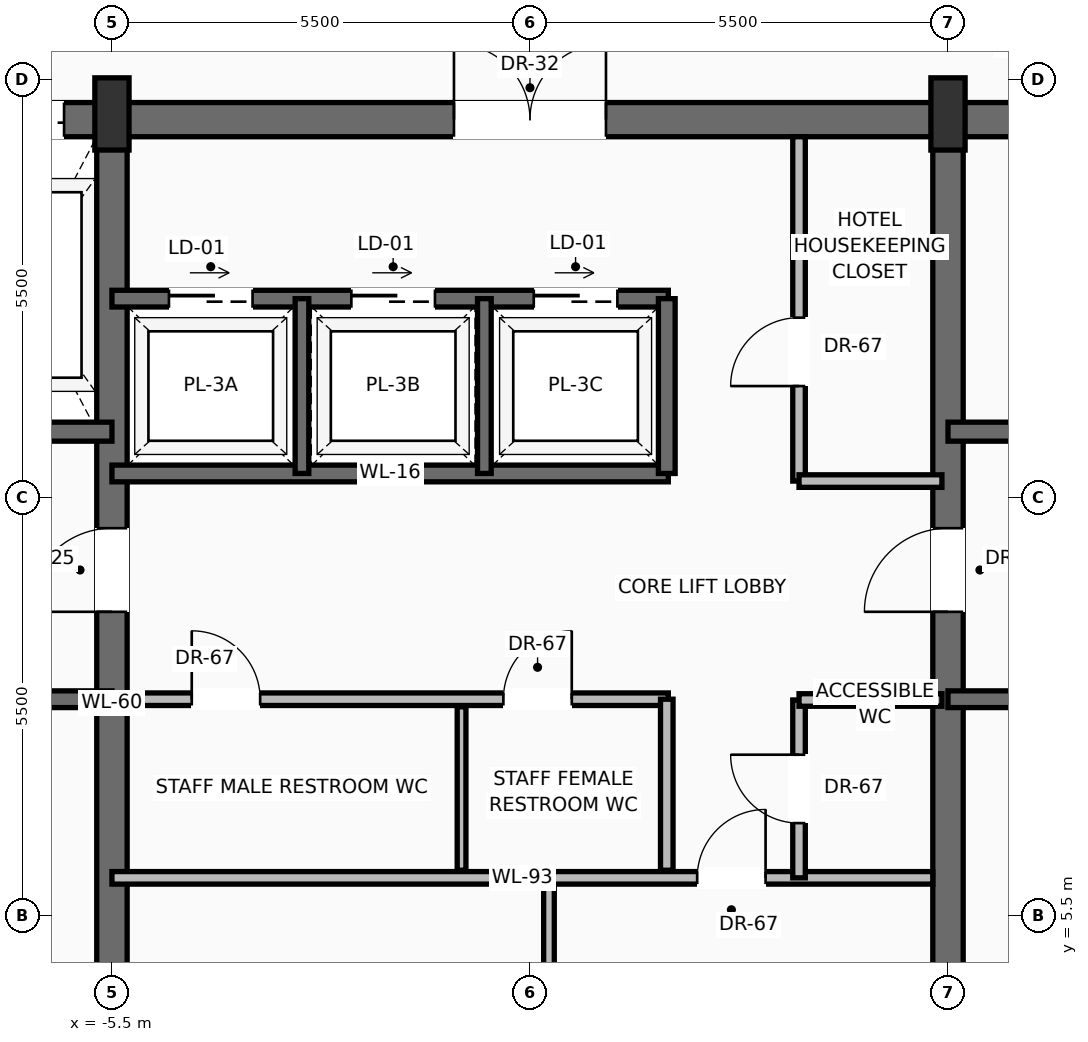
"""IFC4 building model, lengths in metres.
Left out: names, types, materials, properties, quantities, classifications, styles, units other than length and angle.
Written with IfcOpenShell. Run it as: python <this file> out.ifc"""

import sys

from ifc_helpers import new_model, si_unit, direction, frame, frame_2d, origin, origin_2d, place, context, subcontext, project, spatial, rectangle, extrude, source, transform, mapped, element, fill, save


model = new_model("IFC4")
c1 = context("Model", 3, precision=1e-05, world=origin(), true_north=direction((0.0, 1.0)))
c2 = subcontext(c1, "Body", "Model", "MODEL_VIEW")
j1 = project(units=[si_unit("LENGTHUNIT", "METRE"), si_unit("PLANEANGLEUNIT", "RADIAN")], contexts=[c1])
p1 = place(None, origin())
s1 = spatial("IfcSite", under=j1, at=p1, CompositionType="ELEMENT")
p2 = place(p1, origin())
s2 = spatial("IfcBuilding", under=s1, at=p2, CompositionType="ELEMENT")
p3 = place(p2, frame((0.0, 0.0, 300.6)))
s3 = spatial("IfcBuildingStorey", under=s2, at=p3, CompositionType="ELEMENT", Elevation=300.6)
p4 = place(p3, frame((-10.6, 15.975, 0.0), z_axis=(0.0, 0.0, 1.0), x_axis=(1.0, 0.0, 0.0)))
e1 = element("IfcWall", 1, at=p4, inside=s3, PredefinedType="SHEAR", context=c2, shape_type="SweptSolid", body=[
    extrude(rectangle(XDim=21.2, YDim=0.45, at=frame_2d((10.6, 0.0))), origin(), (0.0, 0.0, 1.0), 3.15),
])
p5 = place(p4, frame((3.17, 0.0, 0.0)))
e2 = element("IfcOpeningElement", 2, at=p5, cuts=e1, PredefinedType="OPENING", context=c2, shape_type="SweptSolid", body=[
    extrude(rectangle(XDim=1.3, YDim=2.3, at=frame_2d((0.65, 1.15))), frame((0.0, 0.235, 0.0), z_axis=(0.0, -1.0, 0.0), x_axis=(1.0, 0.0, 0.0)), (0.0, 0.0, 1.0), 0.47),
])
p6 = place(p4, frame((9.6, 0.0, 0.0)))
e3 = element("IfcOpeningElement", 3, at=p6, cuts=e1, PredefinedType="OPENING", context=c2, shape_type="SweptSolid", body=[
    extrude(rectangle(XDim=2.0, YDim=2.4, at=frame_2d((1.0, 1.2))), frame((0.0, 0.235, 0.0), z_axis=(0.0, -1.0, 0.0), x_axis=(1.0, 0.0, 0.0)), (0.0, 0.0, 1.0), 0.47),
])
p7 = place(p3, frame((-5.5, 0.625, 0.0), z_axis=(0.0, 0.0, 1.0), x_axis=(0.0, 1.0, 0.0)))
e4 = element("IfcWall", 4, at=p7, inside=s3, PredefinedType="SHEAR", context=c2, shape_type="SweptSolid", body=[
    extrude(rectangle(XDim=15.35, YDim=0.4, at=frame_2d((7.675, 0.0))), origin(), (0.0, 0.0, 1.0), 3.15),
])
p8 = place(p7, frame((8.875, 0.0, 0.0)))
e5 = element("IfcOpeningElement", 5, at=p8, cuts=e4, PredefinedType="OPENING", context=c2, shape_type="SweptSolid", body=[
    extrude(rectangle(XDim=1.1, YDim=2.2, at=frame_2d((0.55, 1.1))), frame((0.0, 0.21, 0.0), z_axis=(0.0, -1.0, 0.0), x_axis=(1.0, 0.0, 0.0)), (0.0, 0.0, 1.0), 0.42),
])
p9 = place(p3, frame((5.5, 0.625, 0.0), z_axis=(0.0, 0.0, 1.0), x_axis=(0.0, 1.0, 0.0)))
e6 = element("IfcWall", 6, at=p9, inside=s3, PredefinedType="SHEAR", context=c2, shape_type="SweptSolid", body=[
    extrude(rectangle(XDim=15.35, YDim=0.4, at=frame_2d((7.675, 0.0))), origin(), (0.0, 0.0, 1.0), 3.15),
])
p10 = place(p9, frame((8.875, 0.0, 0.0)))
e7 = element("IfcOpeningElement", 7, at=p10, cuts=e6, PredefinedType="OPENING", context=c2, shape_type="SweptSolid", body=[
    extrude(rectangle(XDim=1.1, YDim=2.2, at=frame_2d((0.55, 1.1))), frame((0.0, 0.21, 0.0), z_axis=(0.0, -1.0, 0.0), x_axis=(1.0, 0.0, 0.0)), (0.0, 0.0, 1.0), 0.42),
])
m1 = source(origin(), c2, "Body", "SweptSolid", [
    extrude(rectangle(XDim=0.45, YDim=0.95, at=origin_2d()), origin(), (0.0, 0.0, 1.0), 3.45),
])
for number, where, z_axis, x_axis in (
    (8, (-5.5, 16.05, 0.0), (0.0, 0.0, 1.0), (1.0, 0.0, 0.0)),
    (9, (5.5, 16.05, 0.0), (0.0, 0.0, 1.0), (1.0, 0.0, 0.0)),
):
    element("IfcColumn", number, at=place(p3, frame(where, z_axis=z_axis, x_axis=x_axis)), inside=s3, PredefinedType="PILASTER", context=c2, shape_type="MappedRepresentation", body=[
        mapped(m1, transform((0.0, 0.0, 0.0), scale=1.0)),
    ])
p11 = place(p3, frame((-5.5, 8.35, 0.0), z_axis=(0.0, 0.0, 1.0), x_axis=(-1.0, 0.0, 0.0)))
e10 = element("IfcWall", 10, at=p11, inside=s3, PredefinedType="SOLIDWALL", context=c2, shape_type="SweptSolid", body=[
    extrude(rectangle(XDim=4.65, YDim=0.22, at=frame_2d((2.325, 0.0))), origin(), (0.0, 0.0, 1.0), 3.15),
])
p12 = place(p11, frame((2.5, 0.0, 0.0)))
e11 = element("IfcOpeningElement", 11, at=p12, cuts=e10, PredefinedType="OPENING", context=c2, shape_type="SweptSolid", body=[
    extrude(rectangle(XDim=1.15, YDim=2.2, at=frame_2d((0.575, 1.1))), frame((0.0, 0.12, 0.0), z_axis=(0.0, -1.0, 0.0), x_axis=(1.0, 0.0, 0.0)), (0.0, 0.0, 1.0), 0.24),
])
p13 = place(p3, frame((-5.5, 11.87, 0.0), z_axis=(0.0, 0.0, 1.0), x_axis=(-1.0, 0.0, 0.0)))
e12 = element("IfcWall", 12, at=p13, inside=s3, PredefinedType="SOLIDWALL", context=c2, shape_type="SweptSolid", body=[
    extrude(rectangle(XDim=4.65, YDim=0.25, at=frame_2d((2.325, 0.0))), origin(), (0.0, 0.0, 1.0), 3.15),
])
p14 = place(p13, frame((2.95, 0.0, 0.0)))
e13 = element("IfcOpeningElement", 13, at=p14, cuts=e12, PredefinedType="OPENING", context=c2, shape_type="SweptSolid", body=[
    extrude(rectangle(XDim=1.2, YDim=2.25, at=frame_2d((0.6, 1.125))), frame((0.0, 0.135, 0.0), z_axis=(0.0, -1.0, 0.0), x_axis=(1.0, 0.0, 0.0)), (0.0, 0.0, 1.0), 0.27),
])
p15 = place(p3, frame((10.15, 8.35, 0.0), z_axis=(0.0, 0.0, 1.0), x_axis=(-1.0, 0.0, 0.0)))
e14 = element("IfcWall", 14, at=p15, inside=s3, PredefinedType="SOLIDWALL", context=c2, shape_type="SweptSolid", body=[
    extrude(rectangle(XDim=4.65, YDim=0.22, at=frame_2d((2.325, 0.0))), origin(), (0.0, 0.0, 1.0), 3.15),
])
p16 = place(p15, frame((1.0, 0.0, 0.0)))
e15 = element("IfcOpeningElement", 15, at=p16, cuts=e14, PredefinedType="OPENING", context=c2, shape_type="SweptSolid", body=[
    extrude(rectangle(XDim=1.15, YDim=2.2, at=frame_2d((0.575, 1.1))), frame((0.0, 0.12, 0.0), z_axis=(0.0, -1.0, 0.0), x_axis=(1.0, 0.0, 0.0)), (0.0, 0.0, 1.0), 0.24),
])
p17 = place(p3, frame((10.15, 11.87, 0.0), z_axis=(0.0, 0.0, 1.0), x_axis=(-1.0, 0.0, 0.0)))
e16 = element("IfcWall", 16, at=p17, inside=s3, PredefinedType="SOLIDWALL", context=c2, shape_type="SweptSolid", body=[
    extrude(rectangle(XDim=4.65, YDim=0.25, at=frame_2d((2.325, 0.0))), origin(), (0.0, 0.0, 1.0), 3.15),
])
p18 = place(p17, frame((0.5, 0.0, 0.0)))
e17 = element("IfcOpeningElement", 17, at=p18, cuts=e16, PredefinedType="OPENING", context=c2, shape_type="SweptSolid", body=[
    extrude(rectangle(XDim=1.2, YDim=2.25, at=frame_2d((0.6, 1.125))), frame((0.0, 0.135, 0.0), z_axis=(0.0, -1.0, 0.0), x_axis=(1.0, 0.0, 0.0)), (0.0, 0.0, 1.0), 0.27),
])
p19 = place(p3, frame((-5.5, 6.0, 0.0), z_axis=(0.0, 0.0, 1.0), x_axis=(1.0, 0.0, 0.0)))
e18 = element("IfcWall", 18, at=p19, inside=s3, PredefinedType="PARTITIONING", context=c2, shape_type="SweptSolid", body=[
    extrude(rectangle(XDim=10.8, YDim=0.165, at=frame_2d((5.4, 0.0))), origin(), (0.0, 0.0, 1.0), 3.142),
])
p20 = place(p19, frame((7.7, 0.0, 0.0)))
e19 = element("IfcOpeningElement", 19, at=p20, cuts=e18, PredefinedType="OPENING", context=c2, shape_type="SweptSolid", body=[
    extrude(rectangle(XDim=0.9, YDim=2.1, at=frame_2d((0.45, 1.05))), frame((0.0, 0.093, 0.0), z_axis=(0.0, -1.0, 0.0), x_axis=(1.0, 0.0, 0.0)), (0.0, 0.0, 1.0), 0.185),
])
p21 = place(p3, frame((0.25, 0.85, 0.0), z_axis=(0.0, 0.0, 1.0), x_axis=(0.0, 1.0, 0.0)))
e20 = element("IfcWall", 20, at=p21, inside=s3, PredefinedType="PARTITIONING", context=c2, shape_type="SweptSolid", body=[
    extrude(rectangle(XDim=5.03, YDim=0.14, at=frame_2d((2.515, 0.0))), origin(), (0.0, 0.0, 1.0), 3.142),
])
p22 = place(p21, frame((2.1, 0.0, 0.0)))
e21 = element("IfcOpeningElement", 21, at=p22, cuts=e20, PredefinedType="OPENING", context=c2, shape_type="SweptSolid", body=[
    extrude(rectangle(XDim=0.9, YDim=2.1, at=frame_2d((0.45, 1.05))), frame((0.0, 0.08, 0.0), z_axis=(0.0, -1.0, 0.0), x_axis=(1.0, 0.0, 0.0)), (0.0, 0.0, 1.0), 0.16),
])
p23 = place(p3, frame((3.54, 6.0, 0.0), z_axis=(0.0, 0.0, 1.0), x_axis=(0.0, 1.0, 0.0)))
e22 = element("IfcWall", 22, at=p23, inside=s3, PredefinedType="PARTITIONING", context=c2, shape_type="SweptSolid", body=[
    extrude(rectangle(XDim=2.34, YDim=0.165, at=frame_2d((1.17, 0.0))), origin(), (0.0, 0.0, 1.0), 3.142),
])
p24 = place(p23, frame((0.72, 0.0, 0.0)))
e23 = element("IfcOpeningElement", 23, at=p24, cuts=e22, PredefinedType="OPENING", context=c2, shape_type="SweptSolid", body=[
    extrude(rectangle(XDim=0.9, YDim=2.1, at=frame_2d((0.45, 1.05))), frame((0.0, 0.093, 0.0), z_axis=(0.0, -1.0, 0.0), x_axis=(1.0, 0.0, 0.0)), (0.0, 0.0, 1.0), 0.185),
])
p25 = place(p3, frame((3.54, 8.34, 0.0), z_axis=(0.0, 0.0, 1.0), x_axis=(1.0, 0.0, 0.0)))
e24 = element("IfcWall", 24, at=p25, inside=s3, PredefinedType="PARTITIONING", context=c2, shape_type="SweptSolid", body=[
    extrude(rectangle(XDim=1.88, YDim=0.165, at=frame_2d((0.94, 0.0))), origin(), (0.0, 0.0, 1.0), 3.142),
])
p26 = place(p3, frame((-5.3, 8.35, 0.0), z_axis=(0.0, 0.0, 1.0), x_axis=(1.0, 0.0, 0.0)))
e25 = element("IfcWall", 25, at=p26, inside=s3, PredefinedType="PARTITIONING", context=c2, shape_type="SweptSolid", body=[
    extrude(rectangle(XDim=7.12, YDim=0.165, at=frame_2d((3.56, 0.0))), origin(), (0.0, 0.0, 1.0), 3.142),
])
p27 = place(p26, frame((0.85, 0.0, 0.0)))
e26 = element("IfcOpeningElement", 26, at=p27, cuts=e25, PredefinedType="OPENING", context=c2, shape_type="SweptSolid", body=[
    extrude(rectangle(XDim=0.9, YDim=2.1, at=frame_2d((0.45, 1.05))), frame((0.0, 0.093, 0.0), z_axis=(0.0, -1.0, 0.0), x_axis=(1.0, 0.0, 0.0)), (0.0, 0.0, 1.0), 0.185),
])
p28 = place(p26, frame((4.95, 0.0, 0.0)))
e27 = element("IfcOpeningElement", 27, at=p28, cuts=e25, PredefinedType="OPENING", context=c2, shape_type="SweptSolid", body=[
    extrude(rectangle(XDim=0.9, YDim=2.1, at=frame_2d((0.45, 1.05))), frame((0.0, 0.093, 0.0), z_axis=(0.0, -1.0, 0.0), x_axis=(1.0, 0.0, 0.0)), (0.0, 0.0, 1.0), 0.185),
])
p29 = place(p3, frame((1.8, 6.1, 0.0), z_axis=(0.0, 0.0, 1.0), x_axis=(0.0, 1.0, 0.0)))
e28 = element("IfcWall", 28, at=p29, inside=s3, PredefinedType="PARTITIONING", context=c2, shape_type="SweptSolid", body=[
    extrude(rectangle(XDim=2.25, YDim=0.165, at=frame_2d((1.125, 0.0))), origin(), (0.0, 0.0, 1.0), 3.142),
])
p30 = place(p3, frame((-0.9, 6.1, 0.0), z_axis=(0.0, 0.0, 1.0), x_axis=(0.0, 1.0, 0.0)))
e29 = element("IfcWall", 29, at=p30, inside=s3, PredefinedType="PARTITIONING", context=c2, shape_type="SweptSolid", body=[
    extrude(rectangle(XDim=2.15, YDim=0.115, at=frame_2d((1.075, 0.0))), origin(), (0.0, 0.0, 1.0), 3.142),
])
p31 = place(p3, frame((-5.5, 11.32, 0.0), z_axis=(0.0, 0.0, 1.0), x_axis=(1.0, 0.0, 0.0)))
e30 = element("IfcWall", 30, at=p31, inside=s3, PredefinedType="SOLIDWALL", context=c2, shape_type="SweptSolid", body=[
    extrude(rectangle(XDim=7.32, YDim=0.22, at=frame_2d((3.66, 0.0))), origin(), (0.0, 0.0, 1.0), 3.15),
])
p32 = place(p3, frame((-5.5, 13.62, 0.0), z_axis=(0.0, 0.0, 1.0), x_axis=(1.0, 0.0, 0.0)))
e31 = element("IfcWall", 31, at=p32, inside=s3, PredefinedType="SOLIDWALL", context=c2, shape_type="SweptSolid", body=[
    extrude(rectangle(XDim=7.32, YDim=0.22, at=frame_2d((3.66, 0.0))), origin(), (0.0, 0.0, 1.0), 3.15),
])
p33 = place(p32, frame((0.75, 0.0, 0.0)))
e32 = element("IfcOpeningElement", 32, at=p33, cuts=e31, PredefinedType="OPENING", context=c2, shape_type="SweptSolid", body=[
    extrude(rectangle(XDim=1.1, YDim=2.2, at=frame_2d((0.55, 1.1))), frame((0.0, 0.12, 0.0), z_axis=(0.0, -1.0, 0.0), x_axis=(1.0, 0.0, 0.0)), (0.0, 0.0, 1.0), 0.24),
])
p34 = place(p32, frame((3.15, 0.0, 0.0)))
e33 = element("IfcOpeningElement", 33, at=p34, cuts=e31, PredefinedType="OPENING", context=c2, shape_type="SweptSolid", body=[
    extrude(rectangle(XDim=1.1, YDim=2.2, at=frame_2d((0.55, 1.1))), frame((0.0, 0.12, 0.0), z_axis=(0.0, -1.0, 0.0), x_axis=(1.0, 0.0, 0.0)), (0.0, 0.0, 1.0), 0.24),
])
p35 = place(p32, frame((5.55, 0.0, 0.0)))
e34 = element("IfcOpeningElement", 34, at=p35, cuts=e31, PredefinedType="OPENING", context=c2, shape_type="SweptSolid", body=[
    extrude(rectangle(XDim=1.1, YDim=2.2, at=frame_2d((0.55, 1.1))), frame((0.0, 0.12, 0.0), z_axis=(0.0, -1.0, 0.0), x_axis=(1.0, 0.0, 0.0)), (0.0, 0.0, 1.0), 0.24),
])
p36 = place(p3, frame((1.8, 11.32, 0.0), z_axis=(0.0, 0.0, 1.0), x_axis=(0.0, 1.0, 0.0)))
e35 = element("IfcWall", 35, at=p36, inside=s3, PredefinedType="SOLIDWALL", context=c2, shape_type="SweptSolid", body=[
    extrude(rectangle(XDim=2.3, YDim=0.22, at=frame_2d((1.15, 0.0))), origin(), (0.0, 0.0, 1.0), 3.15),
])
for number, where, z_axis, x_axis in (
    (36, (-3.0, 11.32, 0.0), (0.0, 0.0, 1.0), (0.0, 1.0, 0.0)),
    (37, (-0.6, 11.32, 0.0), (0.0, 0.0, 1.0), (0.0, 1.0, 0.0)),
):
    element("IfcWall", number, at=place(p3, frame(where, z_axis=z_axis, x_axis=x_axis)), inside=s3, PredefinedType="SOLIDWALL", context=c2, shape_type="SweptSolid", body=[
        extrude(rectangle(XDim=2.3, YDim=0.18, at=frame_2d((1.15, 0.0))), origin(), (0.0, 0.0, 1.0), 3.15),
    ])
p37 = place(p3, frame((3.54, 11.22, 0.0), z_axis=(0.0, 0.0, 1.0), x_axis=(0.0, 1.0, 0.0)))
e38 = element("IfcWall", 38, at=p37, inside=s3, PredefinedType="PARTITIONING", context=c2, shape_type="SweptSolid", body=[
    extrude(rectangle(XDim=4.53, YDim=0.165, at=frame_2d((2.265, 0.0))), origin(), (0.0, 0.0, 1.0), 3.142),
])
p38 = place(p37, frame((1.25, 0.0, 0.0)))
e39 = element("IfcOpeningElement", 39, at=p38, cuts=e38, PredefinedType="OPENING", context=c2, shape_type="SweptSolid", body=[
    extrude(rectangle(XDim=0.9, YDim=2.1, at=frame_2d((0.45, 1.05))), frame((0.0, 0.093, 0.0), z_axis=(0.0, -1.0, 0.0), x_axis=(1.0, 0.0, 0.0)), (0.0, 0.0, 1.0), 0.185),
])
p39 = place(p3, frame((3.54, 11.22, 0.0), z_axis=(0.0, 0.0, 1.0), x_axis=(1.0, 0.0, 0.0)))
e40 = element("IfcWall", 40, at=p39, inside=s3, PredefinedType="PARTITIONING", context=c2, shape_type="SweptSolid", body=[
    extrude(rectangle(XDim=1.88, YDim=0.165, at=frame_2d((0.94, 0.0))), origin(), (0.0, 0.0, 1.0), 3.142),
])
m2 = source(origin(), c2, "Body", "SweptSolid", [
    extrude(rectangle(XDim=1.1, YDim=2.2, at=frame_2d((0.55, 1.1))), frame((0.0, 0.025, 0.0), z_axis=(0.0, -1.0, 0.0), x_axis=(1.0, 0.0, 0.0)), (0.0, 0.0, 1.0), 0.05),
])
p40 = place(p8, origin())
e41 = element("IfcDoor", 41, at=p40, inside=s3, OperationType="SINGLE_SWING_LEFT", PredefinedType="DOOR", context=c2, shape_type="MappedRepresentation", body=[
    mapped(m2, transform((0.0, 0.0, 0.0), scale=1.0)),
])
fill(e5, e41)
m3 = source(origin(), c2, "Body", "SweptSolid", [
    extrude(rectangle(XDim=1.3, YDim=2.3, at=frame_2d((0.65, 1.15))), frame((0.0, 0.025, 0.0), z_axis=(0.0, -1.0, 0.0), x_axis=(1.0, 0.0, 0.0)), (0.0, 0.0, 1.0), 0.05),
])
p41 = place(p5, origin())
e42 = element("IfcDoor", 42, at=p41, inside=s3, OperationType="SLIDING_TO_RIGHT", PredefinedType="DOOR", context=c2, shape_type="MappedRepresentation", body=[
    mapped(m3, transform((0.0, 0.0, 0.0), scale=1.0)),
])
fill(e2, e42)
p42 = place(p10, origin())
e43 = element("IfcDoor", 43, at=p42, inside=s3, OperationType="SINGLE_SWING_LEFT", PredefinedType="DOOR", context=c2, shape_type="MappedRepresentation", body=[
    mapped(m2, transform((0.0, 0.0, 0.0), scale=1.0)),
])
fill(e7, e43)
m4 = source(origin(), c2, "Body", "SweptSolid", [
    extrude(rectangle(XDim=2.0, YDim=2.4, at=frame_2d((1.0, 1.2))), frame((0.0, 0.025, 0.0), z_axis=(0.0, -1.0, 0.0), x_axis=(1.0, 0.0, 0.0)), (0.0, 0.0, 1.0), 0.05),
])
p43 = place(p6, origin())
e44 = element("IfcDoor", 44, at=p43, inside=s3, OperationType="DOUBLE_DOOR_SINGLE_SWING", PredefinedType="DOOR", context=c2, shape_type="MappedRepresentation", body=[
    mapped(m4, transform((0.0, 0.0, 0.0), scale=1.0)),
])
fill(e3, e44)
m5 = source(origin(), c2, "Body", "SweptSolid", [
    extrude(rectangle(XDim=0.9, YDim=2.1, at=frame_2d((0.45, 1.05))), frame((0.0, 0.025, 0.0), z_axis=(0.0, -1.0, 0.0), x_axis=(1.0, 0.0, 0.0)), (0.0, 0.0, 1.0), 0.05),
])
p44 = place(p20, origin())
e45 = element("IfcDoor", 45, at=p44, inside=s3, OperationType="SINGLE_SWING_RIGHT", PredefinedType="DOOR", context=c2, shape_type="MappedRepresentation", body=[
    mapped(m5, transform((0.0, 0.0, 0.0), scale=1.0)),
])
fill(e19, e45)
p45 = place(p24, origin())
e46 = element("IfcDoor", 46, at=p45, inside=s3, OperationType="SINGLE_SWING_RIGHT", PredefinedType="DOOR", context=c2, shape_type="MappedRepresentation", body=[
    mapped(m5, transform((0.0, 0.0, 0.0), scale=1.0)),
])
fill(e23, e46)
p46 = place(p27, origin())
e47 = element("IfcDoor", 47, at=p46, inside=s3, OperationType="SINGLE_SWING_LEFT", PredefinedType="DOOR", context=c2, shape_type="MappedRepresentation", body=[
    mapped(m5, transform((0.0, 0.0, 0.0), scale=1.0)),
])
fill(e26, e47)
p47 = place(p28, origin())
e48 = element("IfcDoor", 48, at=p47, inside=s3, OperationType="SINGLE_SWING_RIGHT", PredefinedType="DOOR", context=c2, shape_type="MappedRepresentation", body=[
    mapped(m5, transform((0.0, 0.0, 0.0), scale=1.0)),
])
fill(e27, e48)
m6 = source(origin(), c2, "Body", "SweptSolid", [
    extrude(rectangle(XDim=1.1, YDim=2.2, at=frame_2d((0.55, 1.1))), frame((0.0, 0.025, 0.0), z_axis=(0.0, -1.0, 0.0), x_axis=(1.0, 0.0, 0.0)), (0.0, 0.0, 1.0), 0.05),
])
p48 = place(p33, origin())
e49 = element("IfcDoor", 49, at=p48, inside=s3, OperationType="SLIDING_TO_RIGHT", PredefinedType="DOOR", context=c2, shape_type="MappedRepresentation", body=[
    mapped(m6, transform((0.0, 0.0, 0.0), scale=1.0)),
])
fill(e32, e49)
p49 = place(p34, origin())
e50 = element("IfcDoor", 50, at=p49, inside=s3, OperationType="SLIDING_TO_RIGHT", PredefinedType="DOOR", context=c2, shape_type="MappedRepresentation", body=[
    mapped(m6, transform((0.0, 0.0, 0.0), scale=1.0)),
])
fill(e33, e50)
p50 = place(p35, origin())
e51 = element("IfcDoor", 51, at=p50, inside=s3, OperationType="SLIDING_TO_RIGHT", PredefinedType="DOOR", context=c2, shape_type="MappedRepresentation", body=[
    mapped(m6, transform((0.0, 0.0, 0.0), scale=1.0)),
])
fill(e34, e51)
p51 = place(p38, origin())
e52 = element("IfcDoor", 52, at=p51, inside=s3, OperationType="SINGLE_SWING_LEFT", PredefinedType="DOOR", context=c2, shape_type="MappedRepresentation", body=[
    mapped(m5, transform((0.0, 0.0, 0.0), scale=1.0)),
])
fill(e39, e52)
save(model, sys.argv[1])
